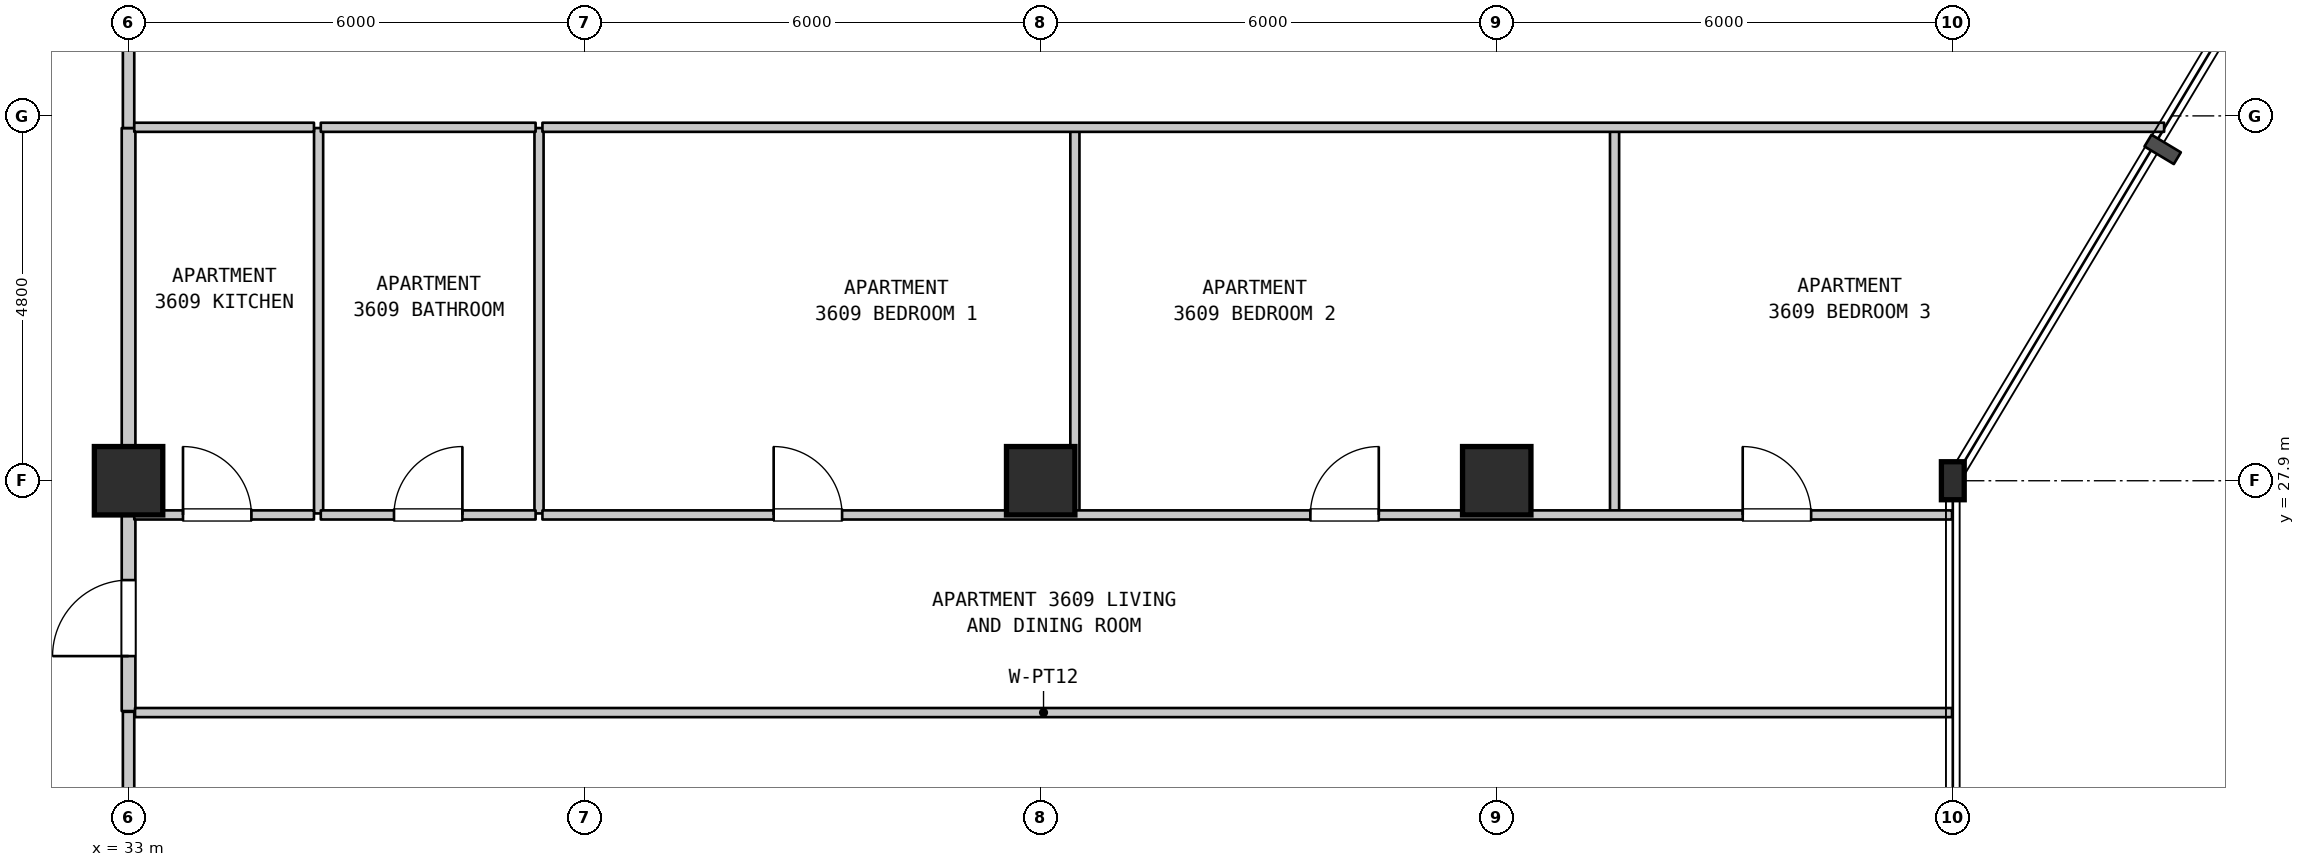
"""IFC4 building model, lengths in metres.
Left out: names, types, materials, properties, quantities, classifications, styles, units other than length and angle.
Written with IfcOpenShell. Run it as: python <this file> out.ifc"""

import sys

from ifc_helpers import new_model, si_unit, direction, frame, frame_2d, origin, origin_2d, place, context, subcontext, project, spatial, rectangle, i_section, extrude, element, fill, save


model = new_model("IFC4")
c1 = context("Model", 3, precision=1e-05, world=origin(), true_north=direction((0.0, 1.0)))
c2 = subcontext(c1, "Body", "Model", "MODEL_VIEW")
j1 = project(units=[si_unit("LENGTHUNIT", "METRE"), si_unit("PLANEANGLEUNIT", "RADIAN")], contexts=[c1])
p1 = place(None, origin())
s1 = spatial("IfcSite", under=j1, at=p1, CompositionType="ELEMENT")
p2 = place(p1, origin())
s2 = spatial("IfcBuilding", under=s1, at=p2, CompositionType="ELEMENT")
p3 = place(p2, frame((0.0, 0.0, 148.3)))
s3 = spatial("IfcBuildingStorey", under=s2, at=p3, CompositionType="ELEMENT", Elevation=148.3)
for number, where, z_axis, x_axis in (
    (1, (33.0, 27.9, 0.0), (0.0, 0.0, 1.0), (1.0, 0.0, 0.0)),
    (2, (45.0, 27.9, 0.0), (0.0, 0.0, 1.0), (1.0, 0.0, 0.0)),
    (3, (51.0, 27.9, 0.0), (0.0, 0.0, 1.0), (1.0, 0.0, 0.0)),
):
    element("IfcColumn", number, at=place(p3, frame(where, z_axis=z_axis, x_axis=x_axis)), inside=s3, PredefinedType="COLUMN", context=c2, shape_type="SweptSolid", body=[
        extrude(rectangle(XDim=0.9, YDim=0.9, at=origin_2d()), origin(), (0.0, 0.0, 1.0), 3.7),
    ])
p4 = place(p3, frame((57.0, 27.9, 0.0), z_axis=(0.0, 0.0, 1.0), x_axis=(1.0, 0.0, 0.0)))
e4 = element("IfcColumn", 4, at=p4, inside=s3, PredefinedType="COLUMN", context=c2, shape_type="SweptSolid", body=[
    extrude(i_section(OverallWidth=0.3, OverallDepth=0.5, WebThickness=0.014, FlangeThickness=0.028, FilletRadius=0.027, at=origin_2d()), origin(), (0.0, 0.0, 1.0), 3.7),
])
p5 = place(p3, frame((33.0, 19.51, 0.0), z_axis=(0.0, 0.0, 1.0), x_axis=(0.0, 1.0, 0.0)))
e5 = element("IfcWall", 5, at=p5, inside=s3, PredefinedType="STANDARD", context=c2, shape_type="SweptSolid", body=[
    extrude(rectangle(XDim=5.35, YDim=0.15, at=frame_2d((2.675, 0.0))), origin(), (0.0, 0.0, 1.0), 2.935),
])
p6 = place(p5, frame((1.534, 0.0, 0.0)))
e6 = element("IfcOpeningElement", 6, at=p6, cuts=e5, PredefinedType="OPENING", context=c2, shape_type="SweptSolid", body=[
    extrude(rectangle(XDim=1.0, YDim=2.15, at=frame_2d((0.5, 1.075))), frame((0.0, 0.085, 0.0), z_axis=(0.0, -1.0, 0.0), x_axis=(1.0, 0.0, 0.0)), (0.0, 0.0, 1.0), 0.17),
])
p7 = place(p3, frame((33.0, 24.87, 0.0), z_axis=(0.0, 0.0, 1.0), x_axis=(0.0, 1.0, 0.0)))
e7 = element("IfcWall", 7, at=p7, inside=s3, PredefinedType="STANDARD", context=c2, shape_type="SweptSolid", body=[
    extrude(rectangle(XDim=2.6, YDim=0.18, at=frame_2d((1.3, 0.0))), origin(), (0.0, 0.0, 1.0), 2.935),
])
p8 = place(p7, frame((0.723, 0.0, 0.0)))
e8 = element("IfcOpeningElement", 8, at=p8, cuts=e7, PredefinedType="OPENING", context=c2, shape_type="SweptSolid", body=[
    extrude(rectangle(XDim=1.0, YDim=2.15, at=frame_2d((0.5, 1.075))), frame((0.0, 0.1, 0.0), z_axis=(0.0, -1.0, 0.0), x_axis=(1.0, 0.0, 0.0)), (0.0, 0.0, 1.0), 0.2),
])
p9 = place(p3, frame((33.0, 27.47, 0.0), z_axis=(0.0, 0.0, 1.0), x_axis=(0.0, 1.0, 0.0)))
e9 = element("IfcWall", 9, at=p9, inside=s3, PredefinedType="STANDARD", context=c2, shape_type="SweptSolid", body=[
    extrude(rectangle(XDim=5.07, YDim=0.18, at=frame_2d((2.535, 0.0))), origin(), (0.0, 0.0, 1.0), 2.885),
])
p10 = place(p3, frame((33.0, 32.54, 0.0), z_axis=(0.0, 0.0, 1.0), x_axis=(0.0, 1.0, 0.0)))
e10 = element("IfcWall", 10, at=p10, inside=s3, PredefinedType="STANDARD", context=c2, shape_type="SweptSolid", body=[
    extrude(rectangle(XDim=5.36, YDim=0.15, at=frame_2d((2.68, 0.0))), origin(), (0.0, 0.0, 1.0), 2.885),
])
p11 = place(p10, frame((2.109, 0.0, 0.0)))
e11 = element("IfcOpeningElement", 11, at=p11, cuts=e10, PredefinedType="OPENING", context=c2, shape_type="SweptSolid", body=[
    extrude(rectangle(XDim=1.0, YDim=2.15, at=frame_2d((0.5, 1.075))), frame((0.0, 0.085, 0.0), z_axis=(0.0, -1.0, 0.0), x_axis=(1.0, 0.0, 0.0)), (0.0, 0.0, 1.0), 0.17),
])
for number, where, z_axis, x_axis in (
    (12, (35.5, 27.47, 0.0), (0.0, 0.0, 1.0), (0.0, 1.0, 0.0)),
    (13, (38.4, 27.47, 0.0), (0.0, 0.0, 1.0), (0.0, 1.0, 0.0)),
    (14, (45.45, 27.47, 0.0), (0.0, 0.0, 1.0), (0.0, 1.0, 0.0)),
    (15, (52.55, 27.47, 0.0), (0.0, 0.0, 1.0), (0.0, 1.0, 0.0)),
):
    element("IfcWall", number, at=place(p3, frame(where, z_axis=z_axis, x_axis=x_axis)), inside=s3, PredefinedType="PARTITIONING", context=c2, shape_type="SweptSolid", body=[
        extrude(rectangle(XDim=5.07, YDim=0.12, at=frame_2d((2.535, 0.0))), origin(), (0.0, 0.0, 1.0), 3.385),
    ])
p12 = place(p3, frame((33.085, 24.85, 0.0), z_axis=(0.0, 0.0, 1.0), x_axis=(1.0, 0.0, 0.0)))
e16 = element("IfcWall", 16, at=p12, inside=s3, PredefinedType="PARTITIONING", context=c2, shape_type="SweptSolid", body=[
    extrude(rectangle(XDim=23.905, YDim=0.12, at=frame_2d((11.953, 0.0))), origin(), (0.0, 0.0, 1.0), 3.385),
])
p13 = place(p3, frame((33.075, 27.45, 0.0), z_axis=(0.0, 0.0, 1.0), x_axis=(1.0, 0.0, 0.0)))
e17 = element("IfcWall", 17, at=p13, inside=s3, PredefinedType="PARTITIONING", context=c2, shape_type="SweptSolid", body=[
    extrude(rectangle(XDim=2.364, YDim=0.12, at=frame_2d((1.182, 0.0))), origin(), (0.0, 0.0, 1.0), 3.385),
])
p14 = place(p13, frame((0.641, 0.0, 0.0)))
e18 = element("IfcOpeningElement", 18, at=p14, cuts=e17, PredefinedType="OPENING", context=c2, shape_type="SweptSolid", body=[
    extrude(rectangle(XDim=0.9, YDim=2.15, at=frame_2d((0.45, 1.075))), frame((0.0, 0.07, 0.0), z_axis=(0.0, -1.0, 0.0), x_axis=(1.0, 0.0, 0.0)), (0.0, 0.0, 1.0), 0.14),
])
p15 = place(p3, frame((35.529, 27.45, 0.0), z_axis=(0.0, 0.0, 1.0), x_axis=(1.0, 0.0, 0.0)))
e19 = element("IfcWall", 19, at=p15, inside=s3, PredefinedType="PARTITIONING", context=c2, shape_type="SweptSolid", body=[
    extrude(rectangle(XDim=2.826, YDim=0.12, at=frame_2d((1.413, 0.0))), origin(), (0.0, 0.0, 1.0), 3.385),
])
p16 = place(p15, frame((0.963, 0.0, 0.0)))
e20 = element("IfcOpeningElement", 20, at=p16, cuts=e19, PredefinedType="OPENING", context=c2, shape_type="SweptSolid", body=[
    extrude(rectangle(XDim=0.9, YDim=2.1, at=frame_2d((0.45, 1.05))), frame((0.0, 0.07, 0.0), z_axis=(0.0, -1.0, 0.0), x_axis=(1.0, 0.0, 0.0)), (0.0, 0.0, 1.0), 0.14),
])
p17 = place(p3, frame((38.445, 27.45, 0.0), z_axis=(0.0, 0.0, 1.0), x_axis=(1.0, 0.0, 0.0)))
e21 = element("IfcWall", 21, at=p17, inside=s3, PredefinedType="PARTITIONING", context=c2, shape_type="SweptSolid", body=[
    extrude(rectangle(XDim=18.545, YDim=0.12, at=frame_2d((9.272, 0.0))), origin(), (0.0, 0.0, 1.0), 3.385),
])
p18 = place(p17, frame((3.042, 0.0, 0.0)))
e22 = element("IfcOpeningElement", 22, at=p18, cuts=e21, PredefinedType="OPENING", context=c2, shape_type="SweptSolid", body=[
    extrude(rectangle(XDim=0.9, YDim=2.15, at=frame_2d((0.45, 1.075))), frame((0.0, 0.07, 0.0), z_axis=(0.0, -1.0, 0.0), x_axis=(1.0, 0.0, 0.0)), (0.0, 0.0, 1.0), 0.14),
])
p19 = place(p17, frame((10.103, 0.0, 0.0)))
e23 = element("IfcOpeningElement", 23, at=p19, cuts=e21, PredefinedType="OPENING", context=c2, shape_type="SweptSolid", body=[
    extrude(rectangle(XDim=0.9, YDim=2.15, at=frame_2d((0.45, 1.075))), frame((0.0, 0.07, 0.0), z_axis=(0.0, -1.0, 0.0), x_axis=(1.0, 0.0, 0.0)), (0.0, 0.0, 1.0), 0.14),
])
p20 = place(p17, frame((15.791, 0.0, 0.0)))
e24 = element("IfcOpeningElement", 24, at=p20, cuts=e21, PredefinedType="OPENING", context=c2, shape_type="SweptSolid", body=[
    extrude(rectangle(XDim=0.9, YDim=2.15, at=frame_2d((0.45, 1.075))), frame((0.0, 0.07, 0.0), z_axis=(0.0, -1.0, 0.0), x_axis=(1.0, 0.0, 0.0)), (0.0, 0.0, 1.0), 0.14),
])
p21 = place(p3, frame((33.075, 32.55, 0.0), z_axis=(0.0, 0.0, 1.0), x_axis=(1.0, 0.0, 0.0)))
e25 = element("IfcWall", 25, at=p21, inside=s3, PredefinedType="PARTITIONING", context=c2, shape_type="SweptSolid", body=[
    extrude(rectangle(XDim=2.364, YDim=0.12, at=frame_2d((1.182, 0.0))), origin(), (0.0, 0.0, 1.0), 3.385),
])
p22 = place(p3, frame((35.529, 32.55, 0.0), z_axis=(0.0, 0.0, 1.0), x_axis=(1.0, 0.0, 0.0)))
e26 = element("IfcWall", 26, at=p22, inside=s3, PredefinedType="PARTITIONING", context=c2, shape_type="SweptSolid", body=[
    extrude(rectangle(XDim=2.826, YDim=0.12, at=frame_2d((1.413, 0.0))), origin(), (0.0, 0.0, 1.0), 3.385),
])
p23 = place(p3, frame((38.445, 32.55, 0.0), z_axis=(0.0, 0.0, 1.0), x_axis=(1.0, 0.0, 0.0)))
e27 = element("IfcWall", 27, at=p23, inside=s3, PredefinedType="PARTITIONING", context=c2, shape_type="SweptSolid", body=[
    extrude(rectangle(XDim=21.335, YDim=0.12, at=frame_2d((10.667, 0.0))), origin(), (0.0, 0.0, 1.0), 3.385),
])
p24 = place(p8, origin())
e28 = element("IfcDoor", 28, at=p24, inside=s3, OperationType="SINGLE_SWING_LEFT", PredefinedType="DOOR", context=c2, shape_type="SweptSolid", body=[
    extrude(rectangle(XDim=1.0, YDim=2.15, at=frame_2d((0.5, 1.075))), frame((0.0, 0.025, 0.0), z_axis=(0.0, -1.0, 0.0), x_axis=(1.0, 0.0, 0.0)), (0.0, 0.0, 1.0), 0.05),
])
fill(e8, e28)
p25 = place(p14, origin())
e29 = element("IfcDoor", 29, at=p25, inside=s3, OperationType="SINGLE_SWING_LEFT", PredefinedType="DOOR", context=c2, shape_type="SweptSolid", body=[
    extrude(rectangle(XDim=0.9, YDim=2.15, at=frame_2d((0.45, 1.075))), frame((0.0, 0.025, 0.0), z_axis=(0.0, -1.0, 0.0), x_axis=(1.0, 0.0, 0.0)), (0.0, 0.0, 1.0), 0.05),
])
fill(e18, e29)
p26 = place(p16, origin())
e30 = element("IfcDoor", 30, at=p26, inside=s3, OperationType="SINGLE_SWING_RIGHT", PredefinedType="DOOR", context=c2, shape_type="SweptSolid", body=[
    extrude(rectangle(XDim=0.9, YDim=2.1, at=frame_2d((0.45, 1.05))), frame((0.0, 0.025, 0.0), z_axis=(0.0, -1.0, 0.0), x_axis=(1.0, 0.0, 0.0)), (0.0, 0.0, 1.0), 0.05),
])
fill(e20, e30)
p27 = place(p18, origin())
e31 = element("IfcDoor", 31, at=p27, inside=s3, OperationType="SINGLE_SWING_LEFT", PredefinedType="DOOR", context=c2, shape_type="SweptSolid", body=[
    extrude(rectangle(XDim=0.9, YDim=2.15, at=frame_2d((0.45, 1.075))), frame((0.0, 0.025, 0.0), z_axis=(0.0, -1.0, 0.0), x_axis=(1.0, 0.0, 0.0)), (0.0, 0.0, 1.0), 0.05),
])
fill(e22, e31)
p28 = place(p19, origin())
e32 = element("IfcDoor", 32, at=p28, inside=s3, OperationType="SINGLE_SWING_RIGHT", PredefinedType="DOOR", context=c2, shape_type="SweptSolid", body=[
    extrude(rectangle(XDim=0.9, YDim=2.15, at=frame_2d((0.45, 1.075))), frame((0.0, 0.025, 0.0), z_axis=(0.0, -1.0, 0.0), x_axis=(1.0, 0.0, 0.0)), (0.0, 0.0, 1.0), 0.05),
])
fill(e23, e32)
p29 = place(p20, origin())
e33 = element("IfcDoor", 33, at=p29, inside=s3, OperationType="SINGLE_SWING_LEFT", PredefinedType="DOOR", context=c2, shape_type="SweptSolid", body=[
    extrude(rectangle(XDim=0.9, YDim=2.15, at=frame_2d((0.45, 1.075))), frame((0.0, 0.025, 0.0), z_axis=(0.0, -1.0, 0.0), x_axis=(1.0, 0.0, 0.0)), (0.0, 0.0, 1.0), 0.05),
])
fill(e24, e33)
save(model, sys.argv[1])
